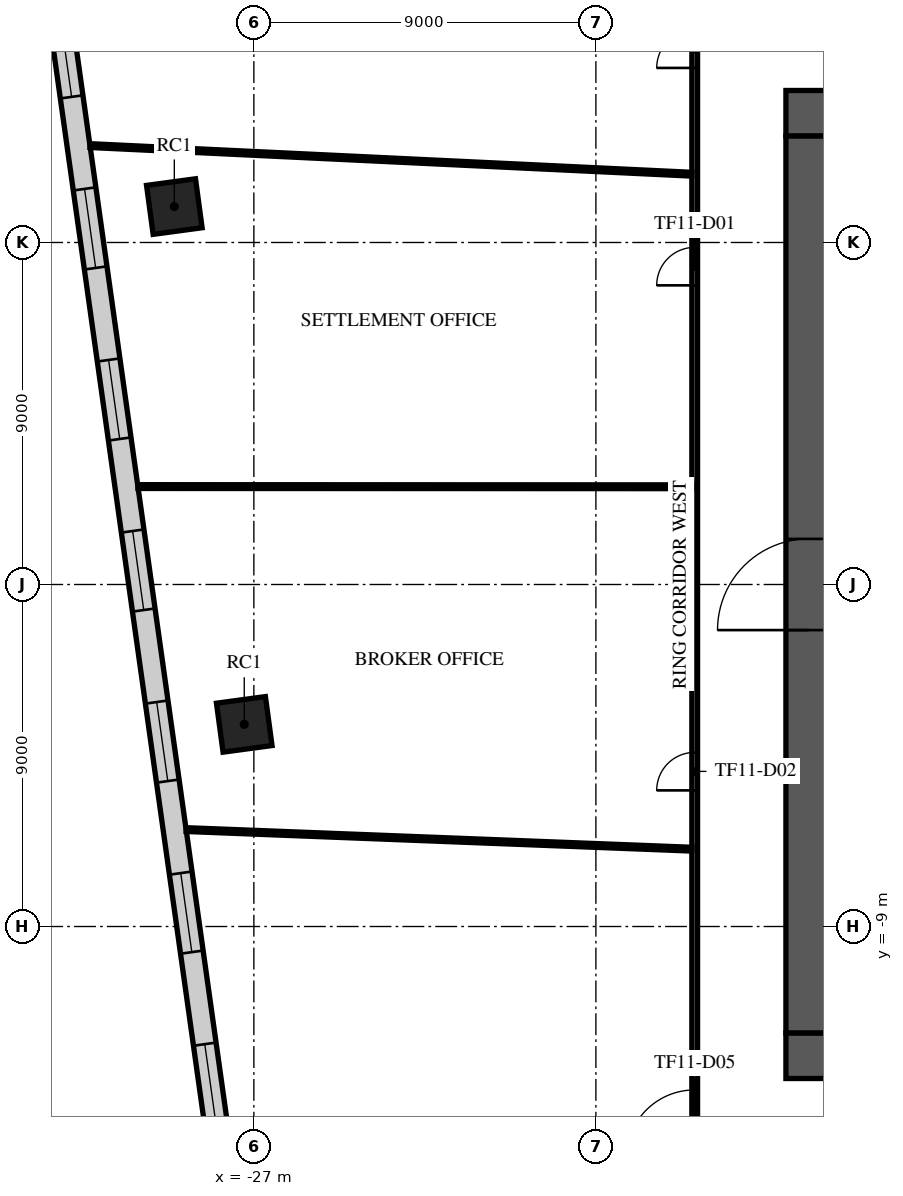
"""IFC4 building model, lengths in metres.
Left out: names, types, materials, properties, quantities, classifications, styles, units other than length and angle.
Written with IfcOpenShell. Run it as: python <this file> out.ifc"""

import sys

from ifc_helpers import new_model, si_unit, direction, frame, frame_2d, origin, origin_2d, place, context, subcontext, project, spatial, rectangle, extrude, element, fill, save


model = new_model("IFC4")
c1 = context("Model", 3, precision=1e-05, world=origin(), true_north=direction((0.0, 1.0)))
c2 = subcontext(c1, "Body", "Model", "MODEL_VIEW")
j1 = project(units=[si_unit("LENGTHUNIT", "METRE"), si_unit("PLANEANGLEUNIT", "RADIAN")], contexts=[c1])
p1 = place(None, origin())
s1 = spatial("IfcSite", under=j1, at=p1, CompositionType="ELEMENT")
p2 = place(p1, origin())
s2 = spatial("IfcBuilding", under=s1, at=p2, CompositionType="ELEMENT")
p3 = place(p2, frame((0.0, 0.0, 51.3)))
s3 = spatial("IfcBuildingStorey", under=s2, at=p3, CompositionType="ELEMENT", Elevation=51.3)
for number, where, z_axis, x_axis in (
    (1, (-29.093, 9.945, 0.0), (0.0, 0.0, 1.0), (0.991, 0.134, 0.0)),
    (2, (-27.253, -3.681, 0.0), (0.0, 0.0, 1.0), (0.991, 0.134, 0.0)),
):
    element("IfcColumn", number, at=place(p3, frame(where, z_axis=z_axis, x_axis=x_axis)), inside=s3, PredefinedType="COLUMN", context=c2, shape_type="SweptSolid", body=[
        extrude(rectangle(XDim=1.3, YDim=1.3, at=origin_2d()), origin(), (0.0, 0.0, 1.0), 4.2),
    ])
p4 = place(p3, frame((-13.0, 12.4, 0.0), z_axis=(0.0, 0.0, 1.0), x_axis=(1.0, 0.0, 0.0)))
e3 = element("IfcWall", 3, at=p4, inside=s3, PredefinedType="SHEAR", context=c2, shape_type="SweptSolid", body=[
    extrude(rectangle(XDim=26.0, YDim=1.2, at=frame_2d((13.0, 0.0))), origin(), (0.0, 0.0, 1.0), 3.75),
])
p5 = place(p4, frame((11.8, 0.0, 0.0)))
e4 = element("IfcOpeningElement", 4, at=p5, cuts=e3, PredefinedType="OPENING", context=c2, shape_type="SweptSolid", body=[
    extrude(rectangle(XDim=2.4, YDim=2.4, at=frame_2d((1.2, 1.2))), frame((0.0, 0.61, 0.0), z_axis=(0.0, -1.0, 0.0), x_axis=(1.0, 0.0, 0.0)), (0.0, 0.0, 1.0), 1.22),
])
p6 = place(p4, frame((22.625, 0.0, 0.0)))
e5 = element("IfcOpeningElement", 5, at=p6, cuts=e3, PredefinedType="OPENING", context=c2, shape_type="SweptSolid", body=[
    extrude(rectangle(XDim=1.2, YDim=2.1, at=frame_2d((0.6, 1.05))), frame((0.0, 0.61, 0.0), z_axis=(0.0, -1.0, 0.0), x_axis=(1.0, 0.0, 0.0)), (0.0, 0.0, 1.0), 1.22),
])
p7 = place(p4, frame((1.6, 0.0, 0.0)))
e6 = element("IfcOpeningElement", 6, at=p7, cuts=e3, PredefinedType="OPENING", context=c2, shape_type="SweptSolid", body=[
    extrude(rectangle(XDim=1.0, YDim=2.1, at=frame_2d((0.5, 1.05))), frame((0.0, 0.61, 0.0), z_axis=(0.0, -1.0, 0.0), x_axis=(1.0, 0.0, 0.0)), (0.0, 0.0, 1.0), 1.22),
])
p8 = place(p3, frame((-13.0, -12.4, 0.0), z_axis=(0.0, 0.0, 1.0), x_axis=(1.0, 0.0, 0.0)))
e7 = element("IfcWall", 7, at=p8, inside=s3, PredefinedType="SHEAR", context=c2, shape_type="SweptSolid", body=[
    extrude(rectangle(XDim=26.0, YDim=1.2, at=frame_2d((13.0, 0.0))), origin(), (0.0, 0.0, 1.0), 3.75),
])
p9 = place(p8, frame((7.9, 0.0, 0.0)))
e8 = element("IfcOpeningElement", 8, at=p9, cuts=e7, PredefinedType="OPENING", context=c2, shape_type="SweptSolid", body=[
    extrude(rectangle(XDim=2.0, YDim=2.1, at=frame_2d((1.0, 1.05))), frame((0.0, 0.61, 0.0), z_axis=(0.0, -1.0, 0.0), x_axis=(1.0, 0.0, 0.0)), (0.0, 0.0, 1.0), 1.22),
])
p10 = place(p8, frame((18.025, 0.0, 0.0)))
e9 = element("IfcOpeningElement", 9, at=p10, cuts=e7, PredefinedType="OPENING", context=c2, shape_type="SweptSolid", body=[
    extrude(rectangle(XDim=1.2, YDim=2.1, at=frame_2d((0.6, 1.05))), frame((0.0, 0.61, 0.0), z_axis=(0.0, -1.0, 0.0), x_axis=(1.0, 0.0, 0.0)), (0.0, 0.0, 1.0), 1.22),
])
p11 = place(p8, frame((2.175, 0.0, 0.0)))
e10 = element("IfcOpeningElement", 10, at=p11, cuts=e7, PredefinedType="OPENING", context=c2, shape_type="SweptSolid", body=[
    extrude(rectangle(XDim=1.2, YDim=2.1, at=frame_2d((0.6, 1.05))), frame((0.0, 0.61, 0.0), z_axis=(0.0, -1.0, 0.0), x_axis=(1.0, 0.0, 0.0)), (0.0, 0.0, 1.0), 1.22),
])
p12 = place(p8, frame((22.625, 0.0, 0.0)))
e11 = element("IfcOpeningElement", 11, at=p12, cuts=e7, PredefinedType="OPENING", context=c2, shape_type="SweptSolid", body=[
    extrude(rectangle(XDim=1.2, YDim=2.1, at=frame_2d((0.6, 1.05))), frame((0.0, 0.61, 0.0), z_axis=(0.0, -1.0, 0.0), x_axis=(1.0, 0.0, 0.0)), (0.0, 0.0, 1.0), 1.22),
])
p13 = place(p3, frame((-12.4, -11.8, 0.0), z_axis=(0.0, 0.0, 1.0), x_axis=(0.0, 1.0, 0.0)))
e12 = element("IfcWall", 12, at=p13, inside=s3, PredefinedType="SHEAR", context=c2, shape_type="SweptSolid", body=[
    extrude(rectangle(XDim=23.6, YDim=1.2, at=frame_2d((11.8, 0.0))), origin(), (0.0, 0.0, 1.0), 3.75),
])
p14 = place(p13, frame((10.6, 0.0, 0.0)))
e13 = element("IfcOpeningElement", 13, at=p14, cuts=e12, PredefinedType="OPENING", context=c2, shape_type="SweptSolid", body=[
    extrude(rectangle(XDim=2.4, YDim=2.4, at=frame_2d((1.2, 1.2))), frame((0.0, 0.61, 0.0), z_axis=(0.0, -1.0, 0.0), x_axis=(1.0, 0.0, 0.0)), (0.0, 0.0, 1.0), 1.22),
])
p15 = place(p3, frame((-32.873, 20.5, 0.0), z_axis=(0.0, 0.0, 1.0), x_axis=(0.139173101431, -0.990268068675, 0.0)))
e14 = element("IfcWall", 14, at=p15, inside=s3, PredefinedType="STANDARD", context=c2, shape_type="SweptSolid", body=[
    extrude(rectangle(XDim=49.751, YDim=0.6, at=frame_2d((24.876, 0.0))), origin(), (0.0, 0.0, 1.0), 3.75),
])
p16 = place(p15, frame((1.161, 0.0, 0.9)))
e15 = element("IfcOpeningElement", 15, at=p16, cuts=e14, PredefinedType="OPENING", context=c2, shape_type="SweptSolid", body=[
    extrude(rectangle(XDim=2.1, YDim=2.1, at=frame_2d((1.05, 1.05))), frame((0.0, 0.31, 0.0), z_axis=(0.0, -1.0, 0.0), x_axis=(1.0, 0.0, 0.0)), (0.0, 0.0, 1.0), 0.62),
])
p17 = place(p15, frame((5.644, 0.0, 0.9)))
e16 = element("IfcOpeningElement", 16, at=p17, cuts=e14, PredefinedType="OPENING", context=c2, shape_type="SweptSolid", body=[
    extrude(rectangle(XDim=2.1, YDim=2.1, at=frame_2d((1.05, 1.05))), frame((0.0, 0.31, 0.0), z_axis=(0.0, -1.0, 0.0), x_axis=(1.0, 0.0, 0.0)), (0.0, 0.0, 1.0), 0.62),
])
p18 = place(p15, frame((10.189, 0.0, 0.9)))
e17 = element("IfcOpeningElement", 17, at=p18, cuts=e14, PredefinedType="OPENING", context=c2, shape_type="SweptSolid", body=[
    extrude(rectangle(XDim=2.1, YDim=2.1, at=frame_2d((1.05, 1.05))), frame((0.0, 0.31, 0.0), z_axis=(0.0, -1.0, 0.0), x_axis=(1.0, 0.0, 0.0)), (0.0, 0.0, 1.0), 0.62),
])
p19 = place(p15, frame((14.735, 0.0, 0.9)))
e18 = element("IfcOpeningElement", 18, at=p19, cuts=e14, PredefinedType="OPENING", context=c2, shape_type="SweptSolid", body=[
    extrude(rectangle(XDim=2.1, YDim=2.1, at=frame_2d((1.05, 1.05))), frame((0.0, 0.31, 0.0), z_axis=(0.0, -1.0, 0.0), x_axis=(1.0, 0.0, 0.0)), (0.0, 0.0, 1.0), 0.62),
])
p20 = place(p15, frame((19.28, 0.0, 0.9)))
e19 = element("IfcOpeningElement", 19, at=p20, cuts=e14, PredefinedType="OPENING", context=c2, shape_type="SweptSolid", body=[
    extrude(rectangle(XDim=2.1, YDim=2.1, at=frame_2d((1.05, 1.05))), frame((0.0, 0.31, 0.0), z_axis=(0.0, -1.0, 0.0), x_axis=(1.0, 0.0, 0.0)), (0.0, 0.0, 1.0), 0.62),
])
p21 = place(p15, frame((23.826, 0.0, 0.9)))
e20 = element("IfcOpeningElement", 20, at=p21, cuts=e14, PredefinedType="OPENING", context=c2, shape_type="SweptSolid", body=[
    extrude(rectangle(XDim=2.1, YDim=2.1, at=frame_2d((1.05, 1.05))), frame((0.0, 0.31, 0.0), z_axis=(0.0, -1.0, 0.0), x_axis=(1.0, 0.0, 0.0)), (0.0, 0.0, 1.0), 0.62),
])
p22 = place(p15, frame((28.371, 0.0, 0.9)))
e21 = element("IfcOpeningElement", 21, at=p22, cuts=e14, PredefinedType="OPENING", context=c2, shape_type="SweptSolid", body=[
    extrude(rectangle(XDim=2.1, YDim=2.1, at=frame_2d((1.05, 1.05))), frame((0.0, 0.31, 0.0), z_axis=(0.0, -1.0, 0.0), x_axis=(1.0, 0.0, 0.0)), (0.0, 0.0, 1.0), 0.62),
])
p23 = place(p15, frame((32.917, 0.0, 0.9)))
e22 = element("IfcOpeningElement", 22, at=p23, cuts=e14, PredefinedType="OPENING", context=c2, shape_type="SweptSolid", body=[
    extrude(rectangle(XDim=2.1, YDim=2.1, at=frame_2d((1.05, 1.05))), frame((0.0, 0.31, 0.0), z_axis=(0.0, -1.0, 0.0), x_axis=(1.0, 0.0, 0.0)), (0.0, 0.0, 1.0), 0.62),
])
p24 = place(p15, frame((37.462, 0.0, 0.9)))
e23 = element("IfcOpeningElement", 23, at=p24, cuts=e14, PredefinedType="OPENING", context=c2, shape_type="SweptSolid", body=[
    extrude(rectangle(XDim=2.1, YDim=2.1, at=frame_2d((1.05, 1.05))), frame((0.0, 0.31, 0.0), z_axis=(0.0, -1.0, 0.0), x_axis=(1.0, 0.0, 0.0)), (0.0, 0.0, 1.0), 0.62),
])
p25 = place(p15, frame((42.008, 0.0, 0.9)))
e24 = element("IfcOpeningElement", 24, at=p25, cuts=e14, PredefinedType="OPENING", context=c2, shape_type="SweptSolid", body=[
    extrude(rectangle(XDim=2.1, YDim=2.1, at=frame_2d((1.05, 1.05))), frame((0.0, 0.31, 0.0), z_axis=(0.0, -1.0, 0.0), x_axis=(1.0, 0.0, 0.0)), (0.0, 0.0, 1.0), 0.62),
])
p26 = place(p15, frame((46.491, 0.0, 0.9)))
e25 = element("IfcOpeningElement", 25, at=p26, cuts=e14, PredefinedType="OPENING", context=c2, shape_type="SweptSolid", body=[
    extrude(rectangle(XDim=2.1, YDim=2.1, at=frame_2d((1.05, 1.05))), frame((0.0, 0.31, 0.0), z_axis=(0.0, -1.0, 0.0), x_axis=(1.0, 0.0, 0.0)), (0.0, 0.0, 1.0), 0.62),
])
p27 = place(p3, frame((-15.4, -15.4, 0.0), z_axis=(0.0, 0.0, 1.0), x_axis=(0.0, 1.0, 0.0)))
e26 = element("IfcWall", 26, at=p27, inside=s3, PredefinedType="PARTITIONING", context=c2, shape_type="SweptSolid", body=[
    extrude(rectangle(XDim=30.8, YDim=0.15, at=frame_2d((15.4, 0.0))), origin(), (0.0, 0.0, 1.0), 3.25),
])
p28 = place(p27, frame((23.272, 0.0, 0.0)))
e27 = element("IfcOpeningElement", 27, at=p28, cuts=e26, PredefinedType="OPENING", context=c2, shape_type="SweptSolid", body=[
    extrude(rectangle(XDim=1.0, YDim=2.1, at=frame_2d((0.5, 1.05))), frame((0.0, 0.085, 0.0), z_axis=(0.0, -1.0, 0.0), x_axis=(1.0, 0.0, 0.0)), (0.0, 0.0, 1.0), 0.17),
])
p29 = place(p27, frame((9.982, 0.0, 0.0)))
e28 = element("IfcOpeningElement", 28, at=p29, cuts=e26, PredefinedType="OPENING", context=c2, shape_type="SweptSolid", body=[
    extrude(rectangle(XDim=1.0, YDim=2.1, at=frame_2d((0.5, 1.05))), frame((0.0, 0.085, 0.0), z_axis=(0.0, -1.0, 0.0), x_axis=(1.0, 0.0, 0.0)), (0.0, 0.0, 1.0), 0.17),
])
p30 = place(p27, frame((28.993, 0.0, 0.0)))
e29 = element("IfcOpeningElement", 29, at=p30, cuts=e26, PredefinedType="OPENING", context=c2, shape_type="SweptSolid", body=[
    extrude(rectangle(XDim=1.0, YDim=2.1, at=frame_2d((0.5, 1.05))), frame((0.0, 0.085, 0.0), z_axis=(0.0, -1.0, 0.0), x_axis=(1.0, 0.0, 0.0)), (0.0, 0.0, 1.0), 0.17),
])
p31 = place(p27, frame((0.3, 0.0, 0.0)))
e30 = element("IfcOpeningElement", 30, at=p31, cuts=e26, PredefinedType="OPENING", context=c2, shape_type="SweptSolid", body=[
    extrude(rectangle(XDim=1.8, YDim=2.1, at=frame_2d((0.9, 1.05))), frame((0.0, 0.085, 0.0), z_axis=(0.0, -1.0, 0.0), x_axis=(1.0, 0.0, 0.0)), (0.0, 0.0, 1.0), 0.17),
])
p32 = place(p3, frame((-31.31, 11.55, 0.0), z_axis=(0.0, 0.0, 1.0), x_axis=(0.998870436484, -0.047516850882, 0.0)))
e31 = element("IfcWall", 31, at=p32, inside=s3, PredefinedType="PARTITIONING", context=c2, shape_type="SweptSolid", body=[
    extrude(rectangle(XDim=15.851, YDim=0.1, at=frame_2d((7.925, 0.0))), origin(), (0.0, 0.0, 1.0), 2.95),
])
p33 = place(p3, frame((-30.049, 2.577, 0.0), z_axis=(0.0, 0.0, 1.0), x_axis=(0.999999943875, -0.000335036416, 0.0)))
e32 = element("IfcWall", 32, at=p33, inside=s3, PredefinedType="PARTITIONING", context=c2, shape_type="SweptSolid", body=[
    extrude(rectangle(XDim=14.574, YDim=0.1, at=frame_2d((7.287, 0.0))), origin(), (0.0, 0.0, 1.0), 2.95),
])
p34 = place(p3, frame((-28.781, -6.45, 0.0), z_axis=(0.0, 0.0, 1.0), x_axis=(0.999250464025, -0.038710594758, 0.0)))
e33 = element("IfcWall", 33, at=p34, inside=s3, PredefinedType="PARTITIONING", context=c2, shape_type="SweptSolid", body=[
    extrude(rectangle(XDim=13.314, YDim=0.1, at=frame_2d((6.657, 0.0))), origin(), (0.0, 0.0, 1.0), 2.95),
])
p35 = place(p14, origin())
e34 = element("IfcDoor", 34, at=p35, inside=s3, OperationType="SINGLE_SWING_LEFT", PredefinedType="DOOR", context=c2, shape_type="SweptSolid", body=[
    extrude(rectangle(XDim=2.4, YDim=2.4, at=frame_2d((1.2, 1.2))), frame((0.0, 0.025, 0.0), z_axis=(0.0, -1.0, 0.0), x_axis=(1.0, 0.0, 0.0)), (0.0, 0.0, 1.0), 0.05),
])
fill(e13, e34)
p36 = place(p17, origin())
e35 = element("IfcWindow", 35, at=p36, inside=s3, PartitioningType="SINGLE_PANEL", PredefinedType="WINDOW", context=c2, shape_type="SweptSolid", body=[
    extrude(rectangle(XDim=2.1, YDim=2.1, at=frame_2d((1.05, 1.05))), frame((0.0, 0.03, 0.0), z_axis=(0.0, -1.0, 0.0), x_axis=(1.0, 0.0, 0.0)), (0.0, 0.0, 1.0), 0.06),
])
fill(e16, e35)
p37 = place(p18, origin())
e36 = element("IfcWindow", 36, at=p37, inside=s3, PartitioningType="SINGLE_PANEL", PredefinedType="WINDOW", context=c2, shape_type="SweptSolid", body=[
    extrude(rectangle(XDim=2.1, YDim=2.1, at=frame_2d((1.05, 1.05))), frame((0.0, 0.03, 0.0), z_axis=(0.0, -1.0, 0.0), x_axis=(1.0, 0.0, 0.0)), (0.0, 0.0, 1.0), 0.06),
])
fill(e17, e36)
p38 = place(p19, origin())
e37 = element("IfcWindow", 37, at=p38, inside=s3, PartitioningType="SINGLE_PANEL", PredefinedType="WINDOW", context=c2, shape_type="SweptSolid", body=[
    extrude(rectangle(XDim=2.1, YDim=2.1, at=frame_2d((1.05, 1.05))), frame((0.0, 0.03, 0.0), z_axis=(0.0, -1.0, 0.0), x_axis=(1.0, 0.0, 0.0)), (0.0, 0.0, 1.0), 0.06),
])
fill(e18, e37)
p39 = place(p20, origin())
e38 = element("IfcWindow", 38, at=p39, inside=s3, PartitioningType="SINGLE_PANEL", PredefinedType="WINDOW", context=c2, shape_type="SweptSolid", body=[
    extrude(rectangle(XDim=2.1, YDim=2.1, at=frame_2d((1.05, 1.05))), frame((0.0, 0.03, 0.0), z_axis=(0.0, -1.0, 0.0), x_axis=(1.0, 0.0, 0.0)), (0.0, 0.0, 1.0), 0.06),
])
fill(e19, e38)
p40 = place(p21, origin())
e39 = element("IfcWindow", 39, at=p40, inside=s3, PartitioningType="SINGLE_PANEL", PredefinedType="WINDOW", context=c2, shape_type="SweptSolid", body=[
    extrude(rectangle(XDim=2.1, YDim=2.1, at=frame_2d((1.05, 1.05))), frame((0.0, 0.03, 0.0), z_axis=(0.0, -1.0, 0.0), x_axis=(1.0, 0.0, 0.0)), (0.0, 0.0, 1.0), 0.06),
])
fill(e20, e39)
p41 = place(p22, origin())
e40 = element("IfcWindow", 40, at=p41, inside=s3, PartitioningType="SINGLE_PANEL", PredefinedType="WINDOW", context=c2, shape_type="SweptSolid", body=[
    extrude(rectangle(XDim=2.1, YDim=2.1, at=frame_2d((1.05, 1.05))), frame((0.0, 0.03, 0.0), z_axis=(0.0, -1.0, 0.0), x_axis=(1.0, 0.0, 0.0)), (0.0, 0.0, 1.0), 0.06),
])
fill(e21, e40)
p42 = place(p23, origin())
e41 = element("IfcWindow", 41, at=p42, inside=s3, PartitioningType="SINGLE_PANEL", PredefinedType="WINDOW", context=c2, shape_type="SweptSolid", body=[
    extrude(rectangle(XDim=2.1, YDim=2.1, at=frame_2d((1.05, 1.05))), frame((0.0, 0.03, 0.0), z_axis=(0.0, -1.0, 0.0), x_axis=(1.0, 0.0, 0.0)), (0.0, 0.0, 1.0), 0.06),
])
fill(e22, e41)
p43 = place(p28, origin())
e42 = element("IfcDoor", 42, at=p43, inside=s3, OperationType="SINGLE_SWING_LEFT", PredefinedType="DOOR", context=c2, shape_type="SweptSolid", body=[
    extrude(rectangle(XDim=1.0, YDim=2.1, at=frame_2d((0.5, 1.05))), frame((0.0, 0.025, 0.0), z_axis=(0.0, -1.0, 0.0), x_axis=(1.0, 0.0, 0.0)), (0.0, 0.0, 1.0), 0.05),
])
fill(e27, e42)
p44 = place(p29, origin())
e43 = element("IfcDoor", 43, at=p44, inside=s3, OperationType="SINGLE_SWING_RIGHT", PredefinedType="DOOR", context=c2, shape_type="SweptSolid", body=[
    extrude(rectangle(XDim=1.0, YDim=2.1, at=frame_2d((0.5, 1.05))), frame((0.0, 0.025, 0.0), z_axis=(0.0, -1.0, 0.0), x_axis=(1.0, 0.0, 0.0)), (0.0, 0.0, 1.0), 0.05),
])
fill(e28, e43)
p45 = place(p30, origin())
e44 = element("IfcDoor", 44, at=p45, inside=s3, OperationType="SINGLE_SWING_LEFT", PredefinedType="DOOR", context=c2, shape_type="SweptSolid", body=[
    extrude(rectangle(XDim=1.0, YDim=2.1, at=frame_2d((0.5, 1.05))), frame((0.0, 0.025, 0.0), z_axis=(0.0, -1.0, 0.0), x_axis=(1.0, 0.0, 0.0)), (0.0, 0.0, 1.0), 0.05),
])
fill(e29, e44)
p46 = place(p31, origin())
e45 = element("IfcDoor", 45, at=p46, inside=s3, OperationType="DOUBLE_DOOR_SINGLE_SWING", PredefinedType="DOOR", context=c2, shape_type="SweptSolid", body=[
    extrude(rectangle(XDim=1.8, YDim=2.1, at=frame_2d((0.9, 1.05))), frame((0.0, 0.025, 0.0), z_axis=(0.0, -1.0, 0.0), x_axis=(1.0, 0.0, 0.0)), (0.0, 0.0, 1.0), 0.05),
])
fill(e30, e45)
save(model, sys.argv[1])
